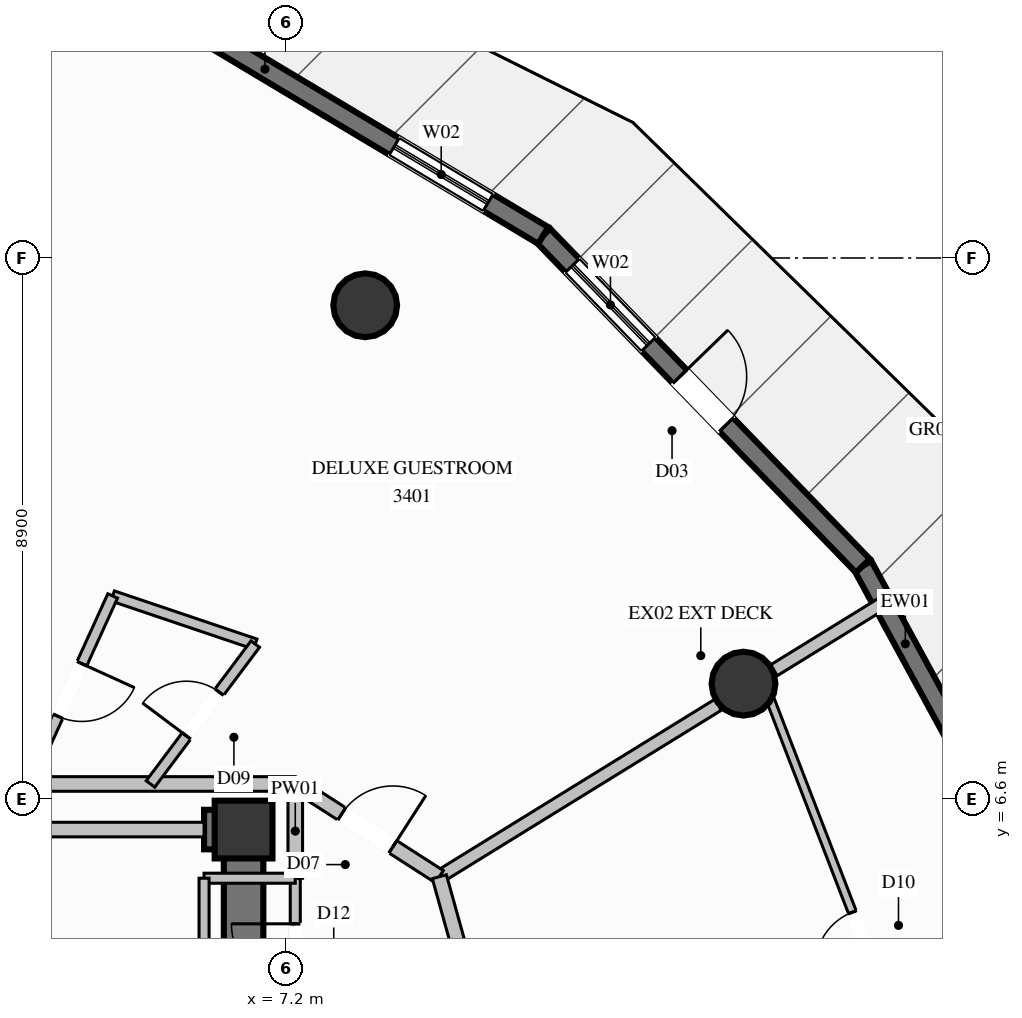
"""IFC4 building model, lengths in metres.
Left out: names, types, materials, properties, quantities, classifications, styles, units other than length and angle.
Written with IfcOpenShell. Run it as: python <this file> out.ifc"""

import sys

from ifc_helpers import new_model, si_unit, direction, frame, frame_2d, origin, origin_2d, place, context, subcontext, project, spatial, rectangle, circle, extrude, element, fill, save


model = new_model("IFC4")
c1 = context("Model", 3, precision=1e-05, world=origin(), true_north=direction((0.0, 1.0)))
c2 = subcontext(c1, "Body", "Model", "MODEL_VIEW")
j1 = project(units=[si_unit("LENGTHUNIT", "METRE"), si_unit("PLANEANGLEUNIT", "RADIAN")], contexts=[c1])
p1 = place(None, origin())
s1 = spatial("IfcSite", under=j1, at=p1, CompositionType="ELEMENT")
p2 = place(p1, origin())
s2 = spatial("IfcBuilding", under=s1, at=p2, CompositionType="ELEMENT")
p3 = place(p2, frame((0.0, 0.0, 127.8)))
s3 = spatial("IfcBuildingStorey", under=s2, at=p3, CompositionType="ELEMENT", Elevation=127.8)
p4 = place(p3, frame((6.5, 6.1, 0.0), z_axis=(0.0, 0.0, 1.0), x_axis=(1.0, 0.0, 0.0)))
e1 = element("IfcColumn", 1, at=p4, inside=s3, PredefinedType="COLUMN", context=c2, shape_type="SweptSolid", body=[
    extrude(rectangle(XDim=0.95, YDim=0.95, at=origin_2d()), origin(), (0.0, 0.0, 1.0), 3.6),
])
p5 = place(p3, frame((5.85, 6.1, 0.0), z_axis=(0.0, 0.0, 1.0), x_axis=(1.0, 0.0, 0.0)))
e2 = element("IfcWall", 2, at=p5, inside=s3, PredefinedType="SHEAR", context=c2, shape_type="SweptSolid", body=[
    extrude(rectangle(XDim=0.325, YDim=0.65, at=frame_2d((0.163, 0.0))), origin(), (0.0, 0.0, 1.0), 3.6),
])
p6 = place(p3, frame((6.5, 3.35, 0.0), z_axis=(0.0, 0.0, 1.0), x_axis=(0.0, 1.0, 0.0)))
e3 = element("IfcWall", 3, at=p6, inside=s3, PredefinedType="SHEAR", context=c2, shape_type="SweptSolid", body=[
    extrude(rectangle(XDim=3.075, YDim=0.65, at=frame_2d((1.538, 0.0))), origin(), (0.0, 0.0, 1.0), 3.6),
])
for number, where, z_axis, x_axis in (
    (4, (14.722, 8.5, 0.0), (0.0, 0.0, 1.0), (1.0, 0.0, 0.0)),
    (5, (8.5, 14.722, 0.0), (0.0, 0.0, 1.0), (1.0, 0.0, 0.0)),
):
    element("IfcColumn", number, at=place(p3, frame(where, z_axis=z_axis, x_axis=x_axis)), inside=s3, PredefinedType="COLUMN", context=c2, shape_type="SweptSolid", body=[
        extrude(circle(Radius=0.525, at=origin_2d()), origin(), (0.0, 0.0, 1.0), 3.6),
    ])
p7 = place(p3, frame((16.685, 10.438, 0.0), z_axis=(0.0, 0.0, 1.0), x_axis=(0.478034683055, -0.878340959876, 0.0)))
e6 = element("IfcWall", 6, at=p7, inside=s3, PredefinedType="SOLIDWALL", context=c2, shape_type="SweptSolid", body=[
    extrude(rectangle(XDim=7.347, YDim=0.32, at=frame_2d((3.673, 0.0))), origin(), (0.0, 0.0, 1.0), 3.35),
])
p8 = place(p7, frame((3.172, 0.0, 0.35)))
e7 = element("IfcOpeningElement", 7, at=p8, cuts=e6, PredefinedType="OPENING", context=c2, shape_type="SweptSolid", body=[
    extrude(rectangle(XDim=1.8, YDim=2.6, at=frame_2d((0.9, 1.3))), frame((0.0, 0.17, 0.0), z_axis=(0.0, -1.0, 0.0), x_axis=(1.0, 0.0, 0.0)), (0.0, 0.0, 1.0), 0.34),
])
p9 = place(p3, frame((11.428, 15.87, 0.0), z_axis=(0.0, 0.0, 1.0), x_axis=(0.695433800966, -0.718590167254, 0.0)))
e8 = element("IfcWall", 8, at=p9, inside=s3, PredefinedType="SOLIDWALL", context=c2, shape_type="SweptSolid", body=[
    extrude(rectangle(XDim=7.559, YDim=0.32, at=frame_2d((3.78, 0.0))), origin(), (0.0, 0.0, 1.0), 3.35),
])
p10 = place(p9, frame((0.69, 0.0, 0.35)))
e9 = element("IfcOpeningElement", 9, at=p10, cuts=e8, PredefinedType="OPENING", context=c2, shape_type="SweptSolid", body=[
    extrude(rectangle(XDim=1.8, YDim=2.6, at=frame_2d((0.9, 1.3))), frame((0.0, 0.17, 0.0), z_axis=(0.0, -1.0, 0.0), x_axis=(1.0, 0.0, 0.0)), (0.0, 0.0, 1.0), 0.34),
])
p11 = place(p9, frame((3.23, 0.0, 0.0)))
e10 = element("IfcOpeningElement", 10, at=p11, cuts=e8, PredefinedType="OPENING", context=c2, shape_type="SweptSolid", body=[
    extrude(rectangle(XDim=1.1, YDim=2.2, at=frame_2d((0.55, 1.1))), frame((0.0, 0.17, 0.0), z_axis=(0.0, -1.0, 0.0), x_axis=(1.0, 0.0, 0.0)), (0.0, 0.0, 1.0), 0.34),
])
p12 = place(p3, frame((4.94, 19.748, 0.0), z_axis=(0.0, 0.0, 1.0), x_axis=(0.858360940194, -0.51304629065, 0.0)))
e11 = element("IfcWall", 11, at=p12, inside=s3, PredefinedType="SOLIDWALL", context=c2, shape_type="SweptSolid", body=[
    extrude(rectangle(XDim=7.559, YDim=0.32, at=frame_2d((3.779, 0.0))), origin(), (0.0, 0.0, 1.0), 3.35),
])
p13 = place(p12, frame((4.704, 0.0, 0.35)))
e12 = element("IfcOpeningElement", 12, at=p13, cuts=e11, PredefinedType="OPENING", context=c2, shape_type="SweptSolid", body=[
    extrude(rectangle(XDim=1.8, YDim=2.6, at=frame_2d((0.9, 1.3))), frame((0.0, 0.17, 0.0), z_axis=(0.0, -1.0, 0.0), x_axis=(1.0, 0.0, 0.0)), (0.0, 0.0, 1.0), 0.34),
])
p14 = place(p3, frame((-7.35, 6.85, 0.0), z_axis=(0.0, 0.0, 1.0), x_axis=(1.0, 0.0, 0.0)))
e13 = element("IfcWall", 13, at=p14, inside=s3, PredefinedType="PARTITIONING", context=c2, shape_type="SweptSolid", body=[
    extrude(rectangle(XDim=14.7, YDim=0.24, at=frame_2d((7.35, 0.0))), origin(), (0.0, 0.0, 1.0), 2.435),
])
p15 = place(p3, frame((7.35, 5.3, 0.0), z_axis=(0.0, 0.0, 1.0), x_axis=(0.0, 1.0, 0.0)))
e14 = element("IfcWall", 14, at=p15, inside=s3, PredefinedType="PARTITIONING", context=c2, shape_type="SweptSolid", body=[
    extrude(rectangle(XDim=1.55, YDim=0.24, at=frame_2d((0.775, 0.0))), origin(), (0.0, 0.0, 1.0), 2.435),
])
p16 = place(p3, frame((3.0, 6.1, 0.0), z_axis=(0.0, 0.0, 1.0), x_axis=(1.0, 0.0, 0.0)))
e15 = element("IfcWall", 15, at=p16, inside=s3, PredefinedType="PARTITIONING", context=c2, shape_type="SweptSolid", body=[
    extrude(rectangle(XDim=2.85, YDim=0.24, at=frame_2d((1.425, 0.0))), origin(), (0.0, 0.0, 1.0), 2.435),
])
p17 = place(p3, frame((7.35, 2.75, 0.0), z_axis=(0.0, 0.0, 1.0), x_axis=(0.0, 1.0, 0.0)))
e16 = element("IfcWall", 16, at=p17, inside=s3, PredefinedType="PARTITIONING", context=c2, shape_type="SweptSolid", body=[
    extrude(rectangle(XDim=2.55, YDim=0.165, at=frame_2d((1.275, 0.0))), origin(), (0.0, 0.0, 1.0), 3.35),
])
p18 = place(p17, frame((0.75, 0.0, 0.0)))
e17 = element("IfcOpeningElement", 17, at=p18, cuts=e16, PredefinedType="OPENING", context=c2, shape_type="SweptSolid", body=[
    extrude(rectangle(XDim=1.05, YDim=2.15, at=frame_2d((0.525, 1.075))), frame((0.0, 0.093, 0.0), z_axis=(0.0, -1.0, 0.0), x_axis=(1.0, 0.0, 0.0)), (0.0, 0.0, 1.0), 0.185),
])
p19 = place(p3, frame((7.35, 5.3, 0.0), z_axis=(0.0, 0.0, 1.0), x_axis=(-1.0, 0.0, 0.0)))
e18 = element("IfcWall", 18, at=p19, inside=s3, PredefinedType="PARTITIONING", context=c2, shape_type="SweptSolid", body=[
    extrude(rectangle(XDim=1.5, YDim=0.165, at=frame_2d((0.75, 0.0))), origin(), (0.0, 0.0, 1.0), 2.435),
])
p20 = place(p3, frame((5.85, 5.3, 0.0), z_axis=(0.0, 0.0, 1.0), x_axis=(0.0, -1.0, 0.0)))
e19 = element("IfcWall", 19, at=p20, inside=s3, PredefinedType="PARTITIONING", context=c2, shape_type="SweptSolid", body=[
    extrude(rectangle(XDim=2.55, YDim=0.165, at=frame_2d((1.275, 0.0))), origin(), (0.0, 0.0, 1.0), 2.435),
])
p21 = place(p3, frame((9.72, 5.325, 0.0), z_axis=(0.0, 0.0, 1.0), x_axis=(0.851091187082, 0.525017896144, 0.0)))
e20 = element("IfcWall", 20, at=p21, inside=s3, PredefinedType="PARTITIONING", context=c2, shape_type="SweptSolid", body=[
    extrude(rectangle(XDim=5.385, YDim=0.21, at=frame_2d((2.692, 0.0))), origin(), (0.0, 0.0, 1.0), 2.717),
])
p22 = place(p3, frame((15.221, 8.719, 0.0), z_axis=(0.0, 0.0, 1.0), x_axis=(0.851220898393, 0.52480756677, 0.0)))
e21 = element("IfcWall", 21, at=p22, inside=s3, PredefinedType="PARTITIONING", context=c2, shape_type="SweptSolid", body=[
    extrude(rectangle(XDim=2.071, YDim=0.21, at=frame_2d((1.036, 0.0))), origin(), (0.0, 0.0, 1.0), 3.35),
])
p23 = place(p3, frame((4.347, 9.942, 0.0), z_axis=(0.0, 0.0, 1.0), x_axis=(0.947423144853, -0.319983413004, 0.0)))
e22 = element("IfcWall", 22, at=p23, inside=s3, PredefinedType="PLUMBINGWALL", context=c2, shape_type="SweptSolid", body=[
    extrude(rectangle(XDim=2.475, YDim=0.175, at=frame_2d((1.238, 0.0))), origin(), (0.0, 0.0, 1.0), 3.35),
])
p24 = place(p3, frame((4.347, 9.942, 0.0), z_axis=(0.0, 0.0, 1.0), x_axis=(-0.414198201163, -0.910186711699, 0.0)))
e23 = element("IfcWall", 23, at=p24, inside=s3, PredefinedType="PLUMBINGWALL", context=c2, shape_type="SweptSolid", body=[
    extrude(rectangle(XDim=3.397, YDim=0.175, at=frame_2d((1.698, 0.0))), origin(), (0.0, 0.0, 1.0), 3.35),
])
p25 = place(p24, frame((1.224, 0.0, 0.0)))
e24 = element("IfcOpeningElement", 24, at=p25, cuts=e23, PredefinedType="OPENING", context=c2, shape_type="SweptSolid", body=[
    extrude(rectangle(XDim=0.95, YDim=2.1, at=frame_2d((0.475, 1.05))), frame((0.0, 0.098, 0.0), z_axis=(0.0, -1.0, 0.0), x_axis=(1.0, 0.0, 0.0)), (0.0, 0.0, 1.0), 0.195),
])
p26 = place(p3, frame((4.969, 6.85, 0.0), z_axis=(0.0, 0.0, 1.0), x_axis=(0.59956491451, 0.80032612933, 0.0)))
e25 = element("IfcWall", 25, at=p26, inside=s3, PredefinedType="PLUMBINGWALL", context=c2, shape_type="SweptSolid", body=[
    extrude(rectangle(XDim=2.874, YDim=0.175, at=frame_2d((1.437, 0.0))), origin(), (0.0, 0.0, 1.0), 2.717),
])
p27 = place(p26, frame((0.987, 0.0, 0.0)))
e26 = element("IfcOpeningElement", 26, at=p27, cuts=e25, PredefinedType="OPENING", context=c2, shape_type="SweptSolid", body=[
    extrude(rectangle(XDim=0.9, YDim=2.1, at=frame_2d((0.45, 1.05))), frame((0.0, 0.098, 0.0), z_axis=(0.0, -1.0, 0.0), x_axis=(1.0, 0.0, 0.0)), (0.0, 0.0, 1.0), 0.195),
])
p28 = place(p3, frame((7.35, 6.85, 0.0), z_axis=(0.0, 0.0, 1.0), x_axis=(0.840910978735, -0.541173471119, 0.0)))
e27 = element("IfcWall", 27, at=p28, inside=s3, PredefinedType="PARTITIONING", context=c2, shape_type="SweptSolid", body=[
    extrude(rectangle(XDim=2.818, YDim=0.24, at=frame_2d((1.409, 0.0))), origin(), (0.0, 0.0, 1.0), 3.35),
])
p29 = place(p28, frame((0.909, 0.0, 0.0)))
e28 = element("IfcOpeningElement", 28, at=p29, cuts=e27, PredefinedType="OPENING", context=c2, shape_type="SweptSolid", body=[
    extrude(rectangle(XDim=1.0, YDim=2.2, at=frame_2d((0.5, 1.1))), frame((0.0, 0.13, 0.0), z_axis=(0.0, -1.0, 0.0), x_axis=(1.0, 0.0, 0.0)), (0.0, 0.0, 1.0), 0.26),
])
p30 = place(p3, frame((11.2, 0.0, 0.0), z_axis=(0.0, 0.0, 1.0), x_axis=(-0.267782838254, 0.963479294815, 0.0)))
e29 = element("IfcWall", 29, at=p30, inside=s3, PredefinedType="PARTITIONING", context=c2, shape_type="SweptSolid", body=[
    extrude(rectangle(XDim=5.527, YDim=0.24, at=frame_2d((2.763, 0.0))), origin(), (0.0, 0.0, 1.0), 3.35),
])
p31 = place(p3, frame((18.343, 0.0, 0.0), z_axis=(0.0, 0.0, 1.0), x_axis=(-0.360296062326, 0.932838007091, 0.0)))
e30 = element("IfcWall", 30, at=p31, inside=s3, PredefinedType="PARTITIONING", context=c2, shape_type="SweptSolid", body=[
    extrude(rectangle(XDim=9.215, YDim=0.135, at=frame_2d((4.607, 0.0))), origin(), (0.0, 0.0, 1.0), 2.879),
])
p32 = place(p31, frame((4.132, 0.0, 0.0)))
e31 = element("IfcOpeningElement", 31, at=p32, cuts=e30, PredefinedType="OPENING", context=c2, shape_type="SweptSolid", body=[
    extrude(rectangle(XDim=0.95, YDim=2.1, at=frame_2d((0.475, 1.05))), frame((0.0, 0.078, 0.0), z_axis=(0.0, -1.0, 0.0), x_axis=(1.0, 0.0, 0.0)), (0.0, 0.0, 1.0), 0.155),
])
p33 = place(p10, origin())
e32 = element("IfcWindow", 32, at=p33, inside=s3, PartitioningType="SINGLE_PANEL", PredefinedType="WINDOW", context=c2, shape_type="SweptSolid", body=[
    extrude(rectangle(XDim=1.8, YDim=2.6, at=frame_2d((0.9, 1.3))), frame((0.0, 0.03, 0.0), z_axis=(0.0, -1.0, 0.0), x_axis=(1.0, 0.0, 0.0)), (0.0, 0.0, 1.0), 0.06),
])
fill(e9, e32)
p34 = place(p11, origin())
e33 = element("IfcDoor", 33, at=p34, inside=s3, OperationType="SINGLE_SWING_LEFT", PredefinedType="DOOR", context=c2, shape_type="SweptSolid", body=[
    extrude(rectangle(XDim=1.1, YDim=2.2, at=frame_2d((0.55, 1.1))), frame((0.0, 0.025, 0.0), z_axis=(0.0, -1.0, 0.0), x_axis=(1.0, 0.0, 0.0)), (0.0, 0.0, 1.0), 0.05),
])
fill(e10, e33)
p35 = place(p13, origin())
e34 = element("IfcWindow", 34, at=p35, inside=s3, PartitioningType="SINGLE_PANEL", PredefinedType="WINDOW", context=c2, shape_type="SweptSolid", body=[
    extrude(rectangle(XDim=1.8, YDim=2.6, at=frame_2d((0.9, 1.3))), frame((0.0, 0.03, 0.0), z_axis=(0.0, -1.0, 0.0), x_axis=(1.0, 0.0, 0.0)), (0.0, 0.0, 1.0), 0.06),
])
fill(e12, e34)
p36 = place(p18, origin())
e35 = element("IfcDoor", 35, at=p36, inside=s3, OperationType="SINGLE_SWING_RIGHT", PredefinedType="DOOR", context=c2, shape_type="SweptSolid", body=[
    extrude(rectangle(XDim=1.05, YDim=2.15, at=frame_2d((0.525, 1.075))), frame((0.0, 0.025, 0.0), z_axis=(0.0, -1.0, 0.0), x_axis=(1.0, 0.0, 0.0)), (0.0, 0.0, 1.0), 0.05),
])
fill(e17, e35)
p37 = place(p27, origin())
e36 = element("IfcDoor", 36, at=p37, inside=s3, OperationType="SINGLE_SWING_LEFT", PredefinedType="DOOR", context=c2, shape_type="SweptSolid", body=[
    extrude(rectangle(XDim=0.9, YDim=2.1, at=frame_2d((0.45, 1.05))), frame((0.0, 0.025, 0.0), z_axis=(0.0, -1.0, 0.0), x_axis=(1.0, 0.0, 0.0)), (0.0, 0.0, 1.0), 0.05),
])
fill(e26, e36)
p38 = place(p29, origin())
e37 = element("IfcDoor", 37, at=p38, inside=s3, OperationType="SINGLE_SWING_RIGHT", PredefinedType="DOOR", context=c2, shape_type="SweptSolid", body=[
    extrude(rectangle(XDim=1.0, YDim=2.2, at=frame_2d((0.5, 1.1))), frame((0.0, 0.025, 0.0), z_axis=(0.0, -1.0, 0.0), x_axis=(1.0, 0.0, 0.0)), (0.0, 0.0, 1.0), 0.05),
])
fill(e28, e37)
p39 = place(p25, origin())
e38 = element("IfcDoor", 38, at=p39, inside=s3, OperationType="SINGLE_SWING_LEFT", PredefinedType="DOOR", context=c2, shape_type="SweptSolid", body=[
    extrude(rectangle(XDim=0.95, YDim=2.1, at=frame_2d((0.475, 1.05))), frame((0.0, 0.025, 0.0), z_axis=(0.0, -1.0, 0.0), x_axis=(1.0, 0.0, 0.0)), (0.0, 0.0, 1.0), 0.05),
])
fill(e24, e38)
p40 = place(p32, origin())
e39 = element("IfcDoor", 39, at=p40, inside=s3, OperationType="SINGLE_SWING_LEFT", PredefinedType="DOOR", context=c2, shape_type="SweptSolid", body=[
    extrude(rectangle(XDim=0.95, YDim=2.1, at=frame_2d((0.475, 1.05))), frame((0.0, 0.025, 0.0), z_axis=(0.0, -1.0, 0.0), x_axis=(1.0, 0.0, 0.0)), (0.0, 0.0, 1.0), 0.05),
])
fill(e31, e39)
save(model, sys.argv[1])
